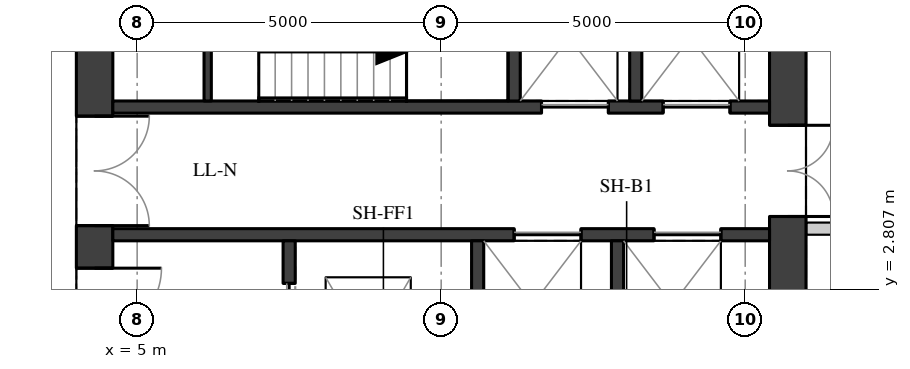
"""IFC4 building model, lengths in metres.
Left out: names, types, materials, properties, quantities, classifications, styles, units other than length and angle.
Written with IfcOpenShell. Run it as: python <this file> out.ifc"""

import sys

from ifc_helpers import new_model, si_unit, direction, frame, frame_2d, origin, place, context, subcontext, project, spatial, rectangle, extrude, element, fill, save


model = new_model("IFC4")
c1 = context("Model", 3, precision=1e-05, world=origin(), true_north=direction((0.0, 1.0)))
c2 = subcontext(c1, "Body", "Model", "MODEL_VIEW")
j1 = project(units=[si_unit("LENGTHUNIT", "METRE"), si_unit("PLANEANGLEUNIT", "RADIAN")], contexts=[c1])
p1 = place(None, origin())
s1 = spatial("IfcSite", under=j1, at=p1, CompositionType="ELEMENT")
p2 = place(p1, origin())
s2 = spatial("IfcBuilding", under=s1, at=p2, CompositionType="ELEMENT")
p3 = place(p2, frame((0.0, 0.0, 218.9)))
s3 = spatial("IfcBuildingStorey", under=s2, at=p3, CompositionType="ELEMENT", Elevation=218.9)
p4 = place(p3, frame((4.3, -9.4, 0.0), z_axis=(0.0, 0.0, 1.0), x_axis=(0.0, 1.0, 0.0)))
e1 = element("IfcWall", 1, at=p4, inside=s3, PredefinedType="SHEAR", context=c2, shape_type="SweptSolid", body=[
    extrude(rectangle(XDim=18.8, YDim=0.6, at=frame_2d((9.4, 0.0))), origin(), (0.0, 0.0, 1.0), 3.02),
])
p5 = place(p4, frame((0.65, 0.0, 0.0)))
e2 = element("IfcOpeningElement", 2, at=p5, cuts=e1, PredefinedType="OPENING", context=c2, shape_type="SweptSolid", body=[
    extrude(rectangle(XDim=1.5, YDim=2.1, at=frame_2d((0.75, 1.05))), frame((0.0, 0.31, 0.0), z_axis=(0.0, -1.0, 0.0), x_axis=(1.0, 0.0, 0.0)), (0.0, 0.0, 1.0), 0.62),
])
p6 = place(p4, frame((3.75, 0.0, 0.0)))
e3 = element("IfcOpeningElement", 3, at=p6, cuts=e1, PredefinedType="OPENING", context=c2, shape_type="SweptSolid", body=[
    extrude(rectangle(XDim=1.8, YDim=2.1, at=frame_2d((0.9, 1.05))), frame((0.0, 0.31, 0.0), z_axis=(0.0, -1.0, 0.0), x_axis=(1.0, 0.0, 0.0)), (0.0, 0.0, 1.0), 0.62),
])
p7 = place(p4, frame((6.25, 0.0, 0.0)))
e4 = element("IfcOpeningElement", 4, at=p7, cuts=e1, PredefinedType="OPENING", context=c2, shape_type="SweptSolid", body=[
    extrude(rectangle(XDim=1.1, YDim=2.1, at=frame_2d((0.55, 1.05))), frame((0.0, 0.31, 0.0), z_axis=(0.0, -1.0, 0.0), x_axis=(1.0, 0.0, 0.0)), (0.0, 0.0, 1.0), 0.62),
])
p8 = place(p4, frame((8.9, 0.0, 0.0)))
e5 = element("IfcOpeningElement", 5, at=p8, cuts=e1, PredefinedType="OPENING", context=c2, shape_type="SweptSolid", body=[
    extrude(rectangle(XDim=1.0, YDim=2.1, at=frame_2d((0.5, 1.05))), frame((0.0, 0.31, 0.0), z_axis=(0.0, -1.0, 0.0), x_axis=(1.0, 0.0, 0.0)), (0.0, 0.0, 1.0), 0.62),
])
p9 = place(p4, frame((11.45, 0.0, 0.0)))
e6 = element("IfcOpeningElement", 6, at=p9, cuts=e1, PredefinedType="OPENING", context=c2, shape_type="SweptSolid", body=[
    extrude(rectangle(XDim=1.1, YDim=2.1, at=frame_2d((0.55, 1.05))), frame((0.0, 0.31, 0.0), z_axis=(0.0, -1.0, 0.0), x_axis=(1.0, 0.0, 0.0)), (0.0, 0.0, 1.0), 0.62),
])
p10 = place(p4, frame((13.25, 0.0, 0.0)))
e7 = element("IfcOpeningElement", 7, at=p10, cuts=e1, PredefinedType="OPENING", context=c2, shape_type="SweptSolid", body=[
    extrude(rectangle(XDim=1.8, YDim=2.1, at=frame_2d((0.9, 1.05))), frame((0.0, 0.31, 0.0), z_axis=(0.0, -1.0, 0.0), x_axis=(1.0, 0.0, 0.0)), (0.0, 0.0, 1.0), 0.62),
])
p11 = place(p4, frame((16.65, 0.0, 0.0)))
e8 = element("IfcOpeningElement", 8, at=p11, cuts=e1, PredefinedType="OPENING", context=c2, shape_type="SweptSolid", body=[
    extrude(rectangle(XDim=1.5, YDim=2.1, at=frame_2d((0.75, 1.05))), frame((0.0, 0.31, 0.0), z_axis=(0.0, -1.0, 0.0), x_axis=(1.0, 0.0, 0.0)), (0.0, 0.0, 1.0), 0.62),
])
p12 = place(p3, frame((15.7, -9.4, 0.0), z_axis=(0.0, 0.0, 1.0), x_axis=(0.0, 1.0, 0.0)))
e9 = element("IfcWall", 9, at=p12, inside=s3, PredefinedType="SHEAR", context=c2, shape_type="SweptSolid", body=[
    extrude(rectangle(XDim=18.8, YDim=0.6, at=frame_2d((9.4, 0.0))), origin(), (0.0, 0.0, 1.0), 3.02),
])
p13 = place(p12, frame((13.4, 0.0, 0.0)))
e10 = element("IfcOpeningElement", 10, at=p13, cuts=e9, PredefinedType="OPENING", context=c2, shape_type="SweptSolid", body=[
    extrude(rectangle(XDim=1.5, YDim=2.1, at=frame_2d((0.75, 1.05))), frame((0.0, 0.31, 0.0), z_axis=(0.0, -1.0, 0.0), x_axis=(1.0, 0.0, 0.0)), (0.0, 0.0, 1.0), 0.62),
])
p14 = place(p12, frame((3.9, 0.0, 0.0)))
e11 = element("IfcOpeningElement", 11, at=p14, cuts=e9, PredefinedType="OPENING", context=c2, shape_type="SweptSolid", body=[
    extrude(rectangle(XDim=1.5, YDim=2.1, at=frame_2d((0.75, 1.05))), frame((0.0, 0.31, 0.0), z_axis=(0.0, -1.0, 0.0), x_axis=(1.0, 0.0, 0.0)), (0.0, 0.0, 1.0), 0.62),
])
p15 = place(p3, frame((4.6, 5.8, 0.0), z_axis=(0.0, 0.0, 1.0), x_axis=(1.0, 0.0, 0.0)))
e12 = element("IfcWall", 12, at=p15, inside=s3, PredefinedType="SHEAR", context=c2, shape_type="SweptSolid", body=[
    extrude(rectangle(XDim=10.8, YDim=0.2, at=frame_2d((5.4, 0.0))), origin(), (0.0, 0.0, 1.0), 3.02),
])
p16 = place(p15, frame((7.05, 0.0, 0.0)))
e13 = element("IfcOpeningElement", 13, at=p16, cuts=e12, PredefinedType="OPENING", context=c2, shape_type="SweptSolid", body=[
    extrude(rectangle(XDim=1.1, YDim=2.1, at=frame_2d((0.55, 1.05))), frame((0.0, 0.11, 0.0), z_axis=(0.0, -1.0, 0.0), x_axis=(1.0, 0.0, 0.0)), (0.0, 0.0, 1.0), 0.22),
])
p17 = place(p15, frame((9.05, 0.0, 0.0)))
e14 = element("IfcOpeningElement", 14, at=p17, cuts=e12, PredefinedType="OPENING", context=c2, shape_type="SweptSolid", body=[
    extrude(rectangle(XDim=1.1, YDim=2.1, at=frame_2d((0.55, 1.05))), frame((0.0, 0.11, 0.0), z_axis=(0.0, -1.0, 0.0), x_axis=(1.0, 0.0, 0.0)), (0.0, 0.0, 1.0), 0.22),
])
p18 = place(p3, frame((4.6, 3.7, 0.0), z_axis=(0.0, 0.0, 1.0), x_axis=(1.0, 0.0, 0.0)))
e15 = element("IfcWall", 15, at=p18, inside=s3, PredefinedType="SHEAR", context=c2, shape_type="SweptSolid", body=[
    extrude(rectangle(XDim=10.8, YDim=0.2, at=frame_2d((5.4, 0.0))), origin(), (0.0, 0.0, 1.0), 3.02),
])
p19 = place(p18, frame((6.6, 0.0, 0.0)))
e16 = element("IfcOpeningElement", 16, at=p19, cuts=e15, PredefinedType="OPENING", context=c2, shape_type="SweptSolid", body=[
    extrude(rectangle(XDim=1.1, YDim=2.1, at=frame_2d((0.55, 1.05))), frame((0.0, 0.11, 0.0), z_axis=(0.0, -1.0, 0.0), x_axis=(1.0, 0.0, 0.0)), (0.0, 0.0, 1.0), 0.22),
])
p20 = place(p18, frame((8.9, 0.0, 0.0)))
e17 = element("IfcOpeningElement", 17, at=p20, cuts=e15, PredefinedType="OPENING", context=c2, shape_type="SweptSolid", body=[
    extrude(rectangle(XDim=1.1, YDim=2.1, at=frame_2d((0.55, 1.05))), frame((0.0, 0.11, 0.0), z_axis=(0.0, -1.0, 0.0), x_axis=(1.0, 0.0, 0.0)), (0.0, 0.0, 1.0), 0.22),
])
for number, where, z_axis, x_axis in (
    (18, (11.2, 5.9, 0.0), (0.0, 0.0, 1.0), (0.0, 1.0, 0.0)),
    (19, (13.2, 5.9, 0.0), (0.0, 0.0, 1.0), (0.0, 1.0, 0.0)),
):
    element("IfcWall", number, at=place(p3, frame(where, z_axis=z_axis, x_axis=x_axis)), inside=s3, PredefinedType="SHEAR", context=c2, shape_type="SweptSolid", body=[
        extrude(rectangle(XDim=3.5, YDim=0.2, at=frame_2d((1.75, 0.0))), origin(), (0.0, 0.0, 1.0), 3.02),
    ])
p21 = place(p3, frame((7.5, 1.1, 0.0), z_axis=(0.0, 0.0, 1.0), x_axis=(0.0, 1.0, 0.0)))
e20 = element("IfcWall", 20, at=p21, inside=s3, PredefinedType="SHEAR", context=c2, shape_type="SweptSolid", body=[
    extrude(rectangle(XDim=2.5, YDim=0.2, at=frame_2d((1.25, 0.0))), origin(), (0.0, 0.0, 1.0), 3.02),
])
p22 = place(p21, frame((0.7, 0.0, 0.0)))
e21 = element("IfcOpeningElement", 21, at=p22, cuts=e20, PredefinedType="OPENING", context=c2, shape_type="SweptSolid", body=[
    extrude(rectangle(XDim=1.1, YDim=2.1, at=frame_2d((0.55, 1.05))), frame((0.0, 0.11, 0.0), z_axis=(0.0, -1.0, 0.0), x_axis=(1.0, 0.0, 0.0)), (0.0, 0.0, 1.0), 0.22),
])
for number, where, z_axis, x_axis in (
    (22, (10.6, 1.1, 0.0), (0.0, 0.0, 1.0), (0.0, 1.0, 0.0)),
    (23, (12.9, 1.1, 0.0), (0.0, 0.0, 1.0), (0.0, 1.0, 0.0)),
):
    element("IfcWall", number, at=place(p3, frame(where, z_axis=z_axis, x_axis=x_axis)), inside=s3, PredefinedType="SHEAR", context=c2, shape_type="SweptSolid", body=[
        extrude(rectangle(XDim=2.5, YDim=0.2, at=frame_2d((1.25, 0.0))), origin(), (0.0, 0.0, 1.0), 3.02),
    ])
p23 = place(p3, frame((6.16, 5.9, 0.0), z_axis=(0.0, 0.0, 1.0), x_axis=(0.0, 1.0, 0.0)))
e24 = element("IfcWall", 24, at=p23, inside=s3, PredefinedType="SHEAR", context=c2, shape_type="SweptSolid", body=[
    extrude(rectangle(XDim=3.5, YDim=0.12, at=frame_2d((1.75, 0.0))), origin(), (0.0, 0.0, 1.0), 3.02),
])
p24 = place(p23, frame((0.85, 0.0, 0.0)))
e25 = element("IfcOpeningElement", 25, at=p24, cuts=e24, PredefinedType="OPENING", context=c2, shape_type="SweptSolid", body=[
    extrude(rectangle(XDim=1.5, YDim=2.1, at=frame_2d((0.75, 1.05))), frame((0.0, 0.07, 0.0), z_axis=(0.0, -1.0, 0.0), x_axis=(1.0, 0.0, 0.0)), (0.0, 0.0, 1.0), 0.14),
])
p25 = place(p3, frame((17.6, 3.8, 0.0), z_axis=(0.0, 0.0, 1.0), x_axis=(-1.0, 0.0, 0.0)))
e26 = element("IfcWall", 26, at=p25, inside=s3, PredefinedType="PARTITIONING", context=c2, shape_type="SweptSolid", body=[
    extrude(rectangle(XDim=1.596, YDim=0.2, at=frame_2d((0.798, 0.0))), origin(), (0.0, 0.0, 1.0), 3.02),
])
p26 = place(p9, origin())
e27 = element("IfcDoor", 27, at=p26, inside=s3, OperationType="SINGLE_SWING_LEFT", PredefinedType="DOOR", context=c2, shape_type="SweptSolid", body=[
    extrude(rectangle(XDim=1.1, YDim=2.1, at=frame_2d((0.55, 1.05))), frame((0.0, 0.025, 0.0), z_axis=(0.0, -1.0, 0.0), x_axis=(1.0, 0.0, 0.0)), (0.0, 0.0, 1.0), 0.05),
])
fill(e6, e27)
p27 = place(p10, origin())
e28 = element("IfcDoor", 28, at=p27, inside=s3, OperationType="DOUBLE_DOOR_SINGLE_SWING", PredefinedType="DOOR", context=c2, shape_type="SweptSolid", body=[
    extrude(rectangle(XDim=1.8, YDim=2.1, at=frame_2d((0.9, 1.05))), frame((0.0, 0.025, 0.0), z_axis=(0.0, -1.0, 0.0), x_axis=(1.0, 0.0, 0.0)), (0.0, 0.0, 1.0), 0.05),
])
fill(e7, e28)
p28 = place(p13, origin())
e29 = element("IfcDoor", 29, at=p28, inside=s3, OperationType="DOUBLE_DOOR_SINGLE_SWING", PredefinedType="DOOR", context=c2, shape_type="SweptSolid", body=[
    extrude(rectangle(XDim=1.5, YDim=2.1, at=frame_2d((0.75, 1.05))), frame((0.0, 0.025, 0.0), z_axis=(0.0, -1.0, 0.0), x_axis=(1.0, 0.0, 0.0)), (0.0, 0.0, 1.0), 0.05),
])
fill(e10, e29)
p29 = place(p16, origin())
e30 = element("IfcDoor", 30, at=p29, inside=s3, OperationType="DOUBLE_DOOR_SLIDING", PredefinedType="DOOR", context=c2, shape_type="SweptSolid", body=[
    extrude(rectangle(XDim=1.1, YDim=2.1, at=frame_2d((0.55, 1.05))), frame((0.0, 0.025, 0.0), z_axis=(0.0, -1.0, 0.0), x_axis=(1.0, 0.0, 0.0)), (0.0, 0.0, 1.0), 0.05),
])
fill(e13, e30)
p30 = place(p17, origin())
e31 = element("IfcDoor", 31, at=p30, inside=s3, OperationType="DOUBLE_DOOR_SLIDING", PredefinedType="DOOR", context=c2, shape_type="SweptSolid", body=[
    extrude(rectangle(XDim=1.1, YDim=2.1, at=frame_2d((0.55, 1.05))), frame((0.0, 0.025, 0.0), z_axis=(0.0, -1.0, 0.0), x_axis=(1.0, 0.0, 0.0)), (0.0, 0.0, 1.0), 0.05),
])
fill(e14, e31)
p31 = place(p19, origin())
e32 = element("IfcDoor", 32, at=p31, inside=s3, OperationType="DOUBLE_DOOR_SLIDING", PredefinedType="DOOR", context=c2, shape_type="SweptSolid", body=[
    extrude(rectangle(XDim=1.1, YDim=2.1, at=frame_2d((0.55, 1.05))), frame((0.0, 0.025, 0.0), z_axis=(0.0, -1.0, 0.0), x_axis=(1.0, 0.0, 0.0)), (0.0, 0.0, 1.0), 0.05),
])
fill(e16, e32)
p32 = place(p20, origin())
e33 = element("IfcDoor", 33, at=p32, inside=s3, OperationType="DOUBLE_DOOR_SLIDING", PredefinedType="DOOR", context=c2, shape_type="SweptSolid", body=[
    extrude(rectangle(XDim=1.1, YDim=2.1, at=frame_2d((0.55, 1.05))), frame((0.0, 0.025, 0.0), z_axis=(0.0, -1.0, 0.0), x_axis=(1.0, 0.0, 0.0)), (0.0, 0.0, 1.0), 0.05),
])
fill(e17, e33)
p33 = place(p22, origin())
e34 = element("IfcDoor", 34, at=p33, inside=s3, OperationType="DOUBLE_DOOR_SLIDING", PredefinedType="DOOR", context=c2, shape_type="SweptSolid", body=[
    extrude(rectangle(XDim=1.1, YDim=2.1, at=frame_2d((0.55, 1.05))), frame((0.0, 0.025, 0.0), z_axis=(0.0, -1.0, 0.0), x_axis=(1.0, 0.0, 0.0)), (0.0, 0.0, 1.0), 0.05),
])
fill(e21, e34)
save(model, sys.argv[1])
